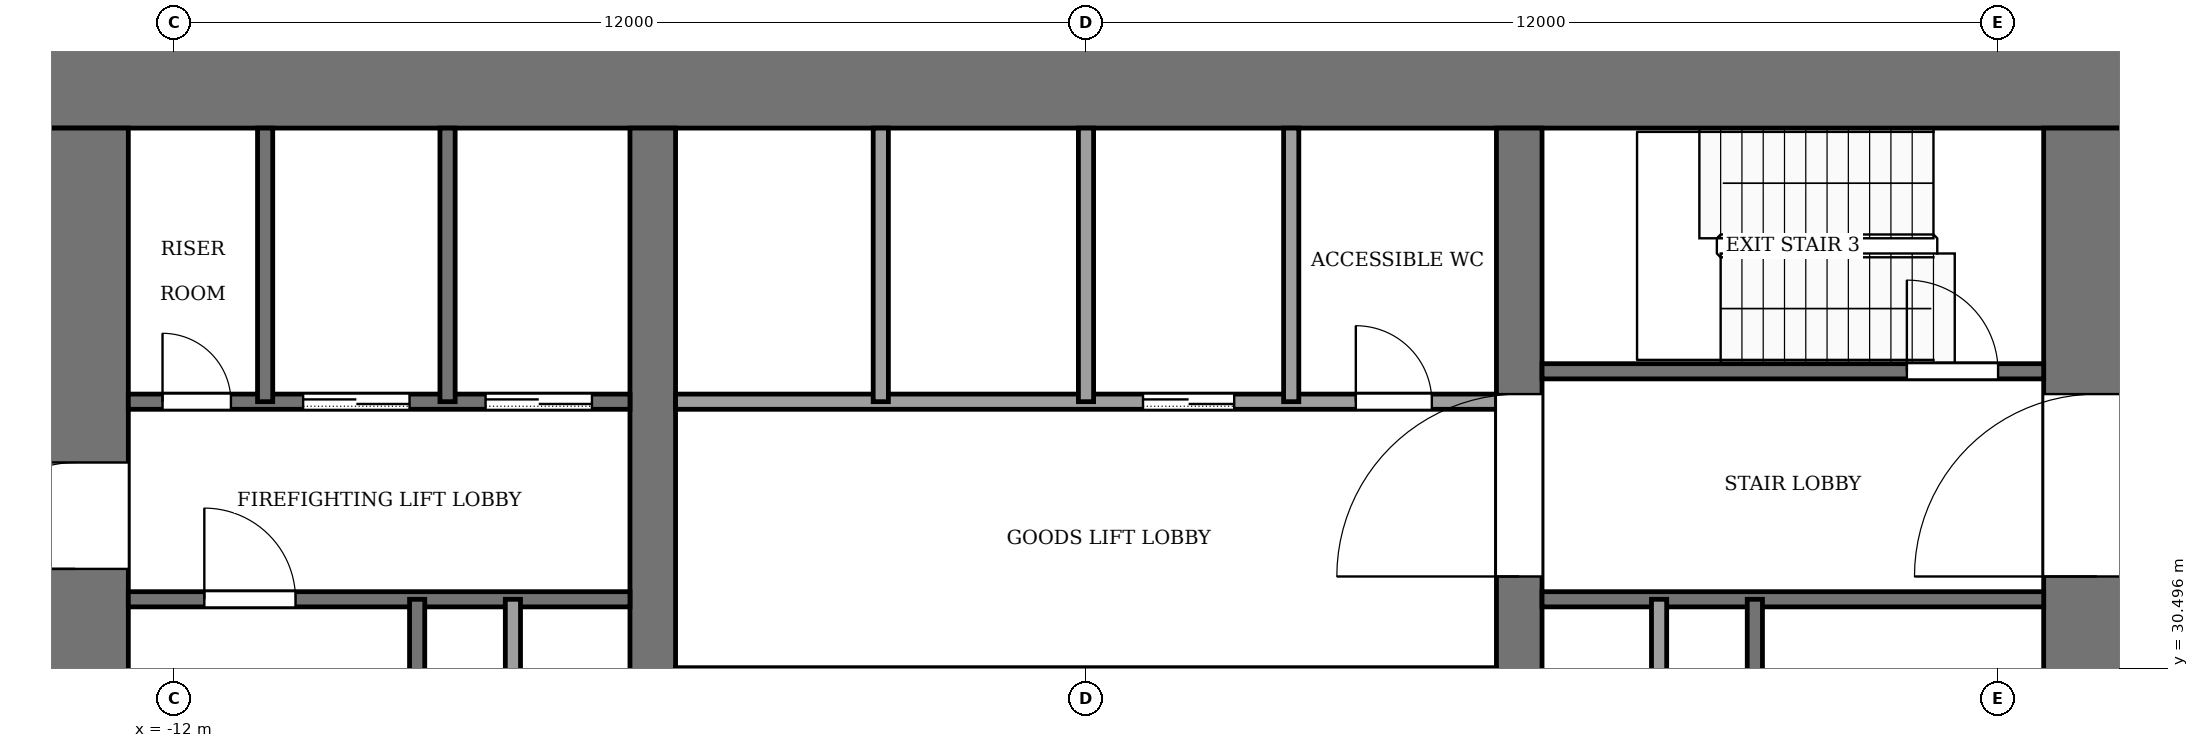
"""IFC4 building model, lengths in metres.
Left out: names, types, materials, properties, quantities, classifications, styles, units other than length and angle.
Written with IfcOpenShell. Run it as: python <this file> out.ifc"""

import sys

from ifc_helpers import new_model, si_unit, direction, frame, frame_2d, origin, place, context, subcontext, project, spatial, rectangle, extrude, element, fill, save


model = new_model("IFC4")
c1 = context("Model", 3, precision=1e-05, world=origin(), true_north=direction((0.0, 1.0)))
c2 = subcontext(c1, "Body", "Model", "MODEL_VIEW")
j1 = project(units=[si_unit("LENGTHUNIT", "METRE"), si_unit("PLANEANGLEUNIT", "RADIAN")], contexts=[c1])
p1 = place(None, origin())
s1 = spatial("IfcSite", under=j1, at=p1, CompositionType="ELEMENT")
p2 = place(p1, origin())
s2 = spatial("IfcBuilding", under=s1, at=p2, CompositionType="ELEMENT")
p3 = place(p2, frame((0.0, 0.0, 54.0)))
s3 = spatial("IfcBuildingStorey", under=s2, at=p3, CompositionType="ELEMENT", Elevation=54.0)
p4 = place(p3, frame((-14.0, 38.3, -0.13), z_axis=(0.0, 0.0, 1.0), x_axis=(1.0, 0.0, 0.0)))
e1 = element("IfcWall", 1, at=p4, inside=s3, PredefinedType="SHEAR", context=c2, shape_type="SweptSolid", body=[
    extrude(rectangle(XDim=28.0, YDim=1.4, at=frame_2d((14.0, 0.0))), origin(), (0.0, 0.0, 1.0), 3.88),
])
p5 = place(p3, frame((-13.3, 18.4, -0.13), z_axis=(0.0, 0.0, 1.0), x_axis=(0.0, 1.0, 0.0)))
e2 = element("IfcWall", 2, at=p5, inside=s3, PredefinedType="SHEAR", context=c2, shape_type="SweptSolid", body=[
    extrude(rectangle(XDim=19.2, YDim=1.4, at=frame_2d((9.6, 0.0))), origin(), (0.0, 0.0, 1.0), 3.88),
])
p6 = place(p5, frame((2.8, 0.0, 0.13)))
e3 = element("IfcOpeningElement", 3, at=p6, cuts=e2, PredefinedType="OPENING", context=c2, shape_type="SweptSolid", body=[
    extrude(rectangle(XDim=2.4, YDim=2.4, at=frame_2d((1.2, 1.2))), frame((0.0, 0.71, 0.0), z_axis=(0.0, -1.0, 0.0), x_axis=(1.0, 0.0, 0.0)), (0.0, 0.0, 1.0), 1.42),
])
p7 = place(p5, frame((13.4, 0.0, 0.13)))
e4 = element("IfcOpeningElement", 4, at=p7, cuts=e2, PredefinedType="OPENING", context=c2, shape_type="SweptSolid", body=[
    extrude(rectangle(XDim=1.4, YDim=2.2, at=frame_2d((0.7, 1.1))), frame((0.0, 0.71, 0.0), z_axis=(0.0, -1.0, 0.0), x_axis=(1.0, 0.0, 0.0)), (0.0, 0.0, 1.0), 1.42),
])
p8 = place(p3, frame((13.3, 18.4, -0.13), z_axis=(0.0, 0.0, 1.0), x_axis=(0.0, 1.0, 0.0)))
e5 = element("IfcWall", 5, at=p8, inside=s3, PredefinedType="SHEAR", context=c2, shape_type="SweptSolid", body=[
    extrude(rectangle(XDim=19.2, YDim=1.4, at=frame_2d((9.6, 0.0))), origin(), (0.0, 0.0, 1.0), 3.88),
])
p9 = place(p8, frame((2.8, 0.0, 0.13)))
e6 = element("IfcOpeningElement", 6, at=p9, cuts=e5, PredefinedType="OPENING", context=c2, shape_type="SweptSolid", body=[
    extrude(rectangle(XDim=2.4, YDim=2.4, at=frame_2d((1.2, 1.2))), frame((0.0, 0.71, 0.0), z_axis=(0.0, -1.0, 0.0), x_axis=(1.0, 0.0, 0.0)), (0.0, 0.0, 1.0), 1.42),
])
p10 = place(p8, frame((13.3, 0.0, 0.13)))
e7 = element("IfcOpeningElement", 7, at=p10, cuts=e5, PredefinedType="OPENING", context=c2, shape_type="SweptSolid", body=[
    extrude(rectangle(XDim=2.4, YDim=2.4, at=frame_2d((1.2, 1.2))), frame((0.0, 0.71, 0.0), z_axis=(0.0, -1.0, 0.0), x_axis=(1.0, 0.0, 0.0)), (0.0, 0.0, 1.0), 1.42),
])
p11 = place(p3, frame((-5.7, 18.4, -0.13), z_axis=(0.0, 0.0, 1.0), x_axis=(0.0, 1.0, 0.0)))
e8 = element("IfcWall", 8, at=p11, inside=s3, PredefinedType="SHEAR", context=c2, shape_type="SweptSolid", body=[
    extrude(rectangle(XDim=19.2, YDim=0.6, at=frame_2d((9.6, 0.0))), origin(), (0.0, 0.0, 1.0), 3.88),
])
p12 = place(p11, frame((8.35, 0.0, 0.13)))
e9 = element("IfcOpeningElement", 9, at=p12, cuts=e8, PredefinedType="OPENING", context=c2, shape_type="SweptSolid", body=[
    extrude(rectangle(XDim=0.9, YDim=2.1, at=frame_2d((0.45, 1.05))), frame((0.0, 0.31, 0.0), z_axis=(0.0, -1.0, 0.0), x_axis=(1.0, 0.0, 0.0)), (0.0, 0.0, 1.0), 0.62),
])
p13 = place(p3, frame((5.7, 18.4, -0.13), z_axis=(0.0, 0.0, 1.0), x_axis=(0.0, 1.0, 0.0)))
e10 = element("IfcWall", 10, at=p13, inside=s3, PredefinedType="SHEAR", context=c2, shape_type="SweptSolid", body=[
    extrude(rectangle(XDim=19.2, YDim=0.6, at=frame_2d((9.6, 0.0))), origin(), (0.0, 0.0, 1.0), 3.88),
])
p14 = place(p13, frame((8.35, 0.0, 0.13)))
e11 = element("IfcOpeningElement", 11, at=p14, cuts=e10, PredefinedType="OPENING", context=c2, shape_type="SweptSolid", body=[
    extrude(rectangle(XDim=0.9, YDim=2.1, at=frame_2d((0.45, 1.05))), frame((0.0, 0.31, 0.0), z_axis=(0.0, -1.0, 0.0), x_axis=(1.0, 0.0, 0.0)), (0.0, 0.0, 1.0), 0.62),
])
p15 = place(p13, frame((13.3, 0.0, 0.13)))
e12 = element("IfcOpeningElement", 12, at=p15, cuts=e10, PredefinedType="OPENING", context=c2, shape_type="SweptSolid", body=[
    extrude(rectangle(XDim=2.4, YDim=2.4, at=frame_2d((1.2, 1.2))), frame((0.0, 0.31, 0.0), z_axis=(0.0, -1.0, 0.0), x_axis=(1.0, 0.0, 0.0)), (0.0, 0.0, 1.0), 0.62),
])
p16 = place(p3, frame((-12.6, 31.4, 0.0), z_axis=(0.0, 0.0, 1.0), x_axis=(1.0, 0.0, 0.0)))
e13 = element("IfcWall", 13, at=p16, inside=s3, PredefinedType="PARTITIONING", context=c2, shape_type="SweptSolid", body=[
    extrude(rectangle(XDim=6.6, YDim=0.2, at=frame_2d((3.3, 0.0))), origin(), (0.0, 0.0, 1.0), 3.75),
])
p17 = place(p16, frame((1.0, 0.0, 0.0)))
e14 = element("IfcOpeningElement", 14, at=p17, cuts=e13, PredefinedType="OPENING", context=c2, shape_type="SweptSolid", body=[
    extrude(rectangle(XDim=1.2, YDim=2.2, at=frame_2d((0.6, 1.1))), frame((0.0, 0.11, 0.0), z_axis=(0.0, -1.0, 0.0), x_axis=(1.0, 0.0, 0.0)), (0.0, 0.0, 1.0), 0.22),
])
p18 = place(p3, frame((6.0, 31.4, 0.0), z_axis=(0.0, 0.0, 1.0), x_axis=(1.0, 0.0, 0.0)))
e15 = element("IfcWall", 15, at=p18, inside=s3, PredefinedType="PARTITIONING", context=c2, shape_type="SweptSolid", body=[
    extrude(rectangle(XDim=6.6, YDim=0.2, at=frame_2d((3.3, 0.0))), origin(), (0.0, 0.0, 1.0), 3.75),
])
p19 = place(p3, frame((-12.6, 34.0, 0.0), z_axis=(0.0, 0.0, 1.0), x_axis=(1.0, 0.0, 0.0)))
e16 = element("IfcWall", 16, at=p19, inside=s3, PredefinedType="PARTITIONING", context=c2, shape_type="SweptSolid", body=[
    extrude(rectangle(XDim=6.6, YDim=0.2, at=frame_2d((3.3, 0.0))), origin(), (0.0, 0.0, 1.0), 3.75),
])
p20 = place(p19, frame((4.7, 0.0, 0.0)))
e17 = element("IfcOpeningElement", 17, at=p20, cuts=e16, PredefinedType="OPENING", context=c2, shape_type="SweptSolid", body=[
    extrude(rectangle(XDim=1.4, YDim=2.2, at=frame_2d((0.7, 1.1))), frame((0.0, 0.11, 0.0), z_axis=(0.0, -1.0, 0.0), x_axis=(1.0, 0.0, 0.0)), (0.0, 0.0, 1.0), 0.22),
])
p21 = place(p19, frame((2.3, 0.0, 0.0)))
e18 = element("IfcOpeningElement", 18, at=p21, cuts=e16, PredefinedType="OPENING", context=c2, shape_type="SweptSolid", body=[
    extrude(rectangle(XDim=1.4, YDim=2.2, at=frame_2d((0.7, 1.1))), frame((0.0, 0.11, 0.0), z_axis=(0.0, -1.0, 0.0), x_axis=(1.0, 0.0, 0.0)), (0.0, 0.0, 1.0), 0.22),
])
p22 = place(p19, frame((0.45, 0.0, 0.0)))
e19 = element("IfcOpeningElement", 19, at=p22, cuts=e16, PredefinedType="OPENING", context=c2, shape_type="SweptSolid", body=[
    extrude(rectangle(XDim=0.9, YDim=2.1, at=frame_2d((0.45, 1.05))), frame((0.0, 0.11, 0.0), z_axis=(0.0, -1.0, 0.0), x_axis=(1.0, 0.0, 0.0)), (0.0, 0.0, 1.0), 0.22),
])
p23 = place(p3, frame((-5.4, 34.0, 0.0), z_axis=(0.0, 0.0, 1.0), x_axis=(1.0, 0.0, 0.0)))
e20 = element("IfcWall", 20, at=p23, inside=s3, PredefinedType="PARTITIONING", context=c2, shape_type="SweptSolid", body=[
    extrude(rectangle(XDim=10.8, YDim=0.2, at=frame_2d((5.4, 0.0))), origin(), (0.0, 0.0, 1.0), 3.75),
])
p24 = place(p23, frame((6.15, 0.0, 0.0)))
e21 = element("IfcOpeningElement", 21, at=p24, cuts=e20, PredefinedType="OPENING", context=c2, shape_type="SweptSolid", body=[
    extrude(rectangle(XDim=1.2, YDim=2.2, at=frame_2d((0.6, 1.1))), frame((0.0, 0.11, 0.0), z_axis=(0.0, -1.0, 0.0), x_axis=(1.0, 0.0, 0.0)), (0.0, 0.0, 1.0), 0.22),
])
p25 = place(p23, frame((8.95, 0.0, 0.0)))
e22 = element("IfcOpeningElement", 22, at=p25, cuts=e20, PredefinedType="OPENING", context=c2, shape_type="SweptSolid", body=[
    extrude(rectangle(XDim=1.0, YDim=2.1, at=frame_2d((0.5, 1.05))), frame((0.0, 0.11, 0.0), z_axis=(0.0, -1.0, 0.0), x_axis=(1.0, 0.0, 0.0)), (0.0, 0.0, 1.0), 0.22),
])
p26 = place(p3, frame((6.0, 34.4, 0.0), z_axis=(0.0, 0.0, 1.0), x_axis=(1.0, 0.0, 0.0)))
e23 = element("IfcWall", 23, at=p26, inside=s3, PredefinedType="PARTITIONING", context=c2, shape_type="SweptSolid", body=[
    extrude(rectangle(XDim=6.6, YDim=0.2, at=frame_2d((3.3, 0.0))), origin(), (0.0, 0.0, 1.0), 3.75),
])
p27 = place(p26, frame((4.8, 0.0, 0.0)))
e24 = element("IfcOpeningElement", 24, at=p27, cuts=e23, PredefinedType="OPENING", context=c2, shape_type="SweptSolid", body=[
    extrude(rectangle(XDim=1.2, YDim=2.2, at=frame_2d((0.6, 1.1))), frame((0.0, 0.11, 0.0), z_axis=(0.0, -1.0, 0.0), x_axis=(1.0, 0.0, 0.0)), (0.0, 0.0, 1.0), 0.22),
])
p28 = place(p3, frame((-10.8, 34.0, 0.0), z_axis=(0.0, 0.0, 1.0), x_axis=(0.0, 1.0, 0.0)))
e25 = element("IfcWall", 25, at=p28, inside=s3, PredefinedType="PARTITIONING", context=c2, shape_type="SweptSolid", body=[
    extrude(rectangle(XDim=3.6, YDim=0.2, at=frame_2d((1.8, 0.0))), origin(), (0.0, 0.0, 1.0), 3.75),
])
p29 = place(p3, frame((-8.8, 24.0, 0.0), z_axis=(0.0, 0.0, 1.0), x_axis=(0.0, 1.0, 0.0)))
e26 = element("IfcWall", 26, at=p29, inside=s3, PredefinedType="PARTITIONING", context=c2, shape_type="SweptSolid", body=[
    extrude(rectangle(XDim=7.4, YDim=0.2, at=frame_2d((3.7, 0.0))), origin(), (0.0, 0.0, 1.0), 3.75),
])
p30 = place(p3, frame((-8.4, 34.0, 0.0), z_axis=(0.0, 0.0, 1.0), x_axis=(0.0, 1.0, 0.0)))
e27 = element("IfcWall", 27, at=p30, inside=s3, PredefinedType="PARTITIONING", context=c2, shape_type="SweptSolid", body=[
    extrude(rectangle(XDim=3.6, YDim=0.2, at=frame_2d((1.8, 0.0))), origin(), (0.0, 0.0, 1.0), 3.75),
])
p31 = place(p3, frame((-7.54, 24.0, 0.0), z_axis=(0.0, 0.0, 1.0), x_axis=(0.0, 1.0, 0.0)))
e28 = element("IfcWall", 28, at=p31, inside=s3, PredefinedType="PARTITIONING", context=c2, shape_type="SweptSolid", body=[
    extrude(rectangle(XDim=7.4, YDim=0.2, at=frame_2d((3.7, 0.0))), origin(), (0.0, 0.0, 1.0), 3.75),
])
for number, where, z_axis, x_axis in (
    (29, (-2.7, 34.0, 0.0), (0.0, 0.0, 1.0), (0.0, 1.0, 0.0)),
    (30, (0.0, 34.0, 0.0), (0.0, 0.0, 1.0), (0.0, 1.0, 0.0)),
    (31, (2.7, 34.0, 0.0), (0.0, 0.0, 1.0), (0.0, 1.0, 0.0)),
):
    element("IfcWall", number, at=place(p3, frame(where, z_axis=z_axis, x_axis=x_axis)), inside=s3, PredefinedType="PARTITIONING", context=c2, shape_type="SweptSolid", body=[
        extrude(rectangle(XDim=3.6, YDim=0.2, at=frame_2d((1.8, 0.0))), origin(), (0.0, 0.0, 1.0), 3.75),
    ])
for number, where, z_axis, x_axis in (
    (32, (7.54, 24.0, 0.0), (0.0, 0.0, 1.0), (0.0, 1.0, 0.0)),
    (33, (8.8, 24.0, 0.0), (0.0, 0.0, 1.0), (0.0, 1.0, 0.0)),
):
    element("IfcWall", number, at=place(p3, frame(where, z_axis=z_axis, x_axis=x_axis)), inside=s3, PredefinedType="PARTITIONING", context=c2, shape_type="SweptSolid", body=[
        extrude(rectangle(XDim=7.4, YDim=0.2, at=frame_2d((3.7, 0.0))), origin(), (0.0, 0.0, 1.0), 3.75),
    ])
p32 = place(p24, origin())
e34 = element("IfcDoor", 34, at=p32, inside=s3, OperationType="SLIDING_TO_LEFT", PredefinedType="DOOR", context=c2, shape_type="SweptSolid", body=[
    extrude(rectangle(XDim=1.2, YDim=2.2, at=frame_2d((0.6, 1.1))), frame((0.0, 0.025, 0.0), z_axis=(0.0, -1.0, 0.0), x_axis=(1.0, 0.0, 0.0)), (0.0, 0.0, 1.0), 0.05),
])
fill(e21, e34)
p33 = place(p20, origin())
e35 = element("IfcDoor", 35, at=p33, inside=s3, OperationType="SLIDING_TO_LEFT", PredefinedType="DOOR", context=c2, shape_type="SweptSolid", body=[
    extrude(rectangle(XDim=1.4, YDim=2.2, at=frame_2d((0.7, 1.1))), frame((0.0, 0.025, 0.0), z_axis=(0.0, -1.0, 0.0), x_axis=(1.0, 0.0, 0.0)), (0.0, 0.0, 1.0), 0.05),
])
fill(e17, e35)
p34 = place(p21, origin())
e36 = element("IfcDoor", 36, at=p34, inside=s3, OperationType="SLIDING_TO_LEFT", PredefinedType="DOOR", context=c2, shape_type="SweptSolid", body=[
    extrude(rectangle(XDim=1.4, YDim=2.2, at=frame_2d((0.7, 1.1))), frame((0.0, 0.025, 0.0), z_axis=(0.0, -1.0, 0.0), x_axis=(1.0, 0.0, 0.0)), (0.0, 0.0, 1.0), 0.05),
])
fill(e18, e36)
p35 = place(p22, origin())
e37 = element("IfcDoor", 37, at=p35, inside=s3, OperationType="SINGLE_SWING_RIGHT", PredefinedType="DOOR", context=c2, shape_type="SweptSolid", body=[
    extrude(rectangle(XDim=0.9, YDim=2.1, at=frame_2d((0.45, 1.05))), frame((0.0, 0.025, 0.0), z_axis=(0.0, -1.0, 0.0), x_axis=(1.0, 0.0, 0.0)), (0.0, 0.0, 1.0), 0.05),
])
fill(e19, e37)
p36 = place(p25, origin())
e38 = element("IfcDoor", 38, at=p36, inside=s3, OperationType="SINGLE_SWING_LEFT", PredefinedType="DOOR", context=c2, shape_type="SweptSolid", body=[
    extrude(rectangle(XDim=1.0, YDim=2.1, at=frame_2d((0.5, 1.05))), frame((0.0, 0.025, 0.0), z_axis=(0.0, -1.0, 0.0), x_axis=(1.0, 0.0, 0.0)), (0.0, 0.0, 1.0), 0.05),
])
fill(e22, e38)
p37 = place(p17, origin())
e39 = element("IfcDoor", 39, at=p37, inside=s3, OperationType="SINGLE_SWING_LEFT", PredefinedType="DOOR", context=c2, shape_type="SweptSolid", body=[
    extrude(rectangle(XDim=1.2, YDim=2.2, at=frame_2d((0.6, 1.1))), frame((0.0, 0.025, 0.0), z_axis=(0.0, -1.0, 0.0), x_axis=(1.0, 0.0, 0.0)), (0.0, 0.0, 1.0), 0.05),
])
fill(e14, e39)
p38 = place(p27, origin())
e40 = element("IfcDoor", 40, at=p38, inside=s3, OperationType="SINGLE_SWING_LEFT", PredefinedType="DOOR", context=c2, shape_type="SweptSolid", body=[
    extrude(rectangle(XDim=1.2, YDim=2.2, at=frame_2d((0.6, 1.1))), frame((0.0, 0.025, 0.0), z_axis=(0.0, -1.0, 0.0), x_axis=(1.0, 0.0, 0.0)), (0.0, 0.0, 1.0), 0.05),
])
fill(e24, e40)
p39 = place(p15, origin())
e41 = element("IfcDoor", 41, at=p39, inside=s3, OperationType="DOUBLE_DOOR_SINGLE_SWING", PredefinedType="DOOR", context=c2, shape_type="SweptSolid", body=[
    extrude(rectangle(XDim=2.4, YDim=2.4, at=frame_2d((1.2, 1.2))), frame((0.0, 0.025, 0.0), z_axis=(0.0, -1.0, 0.0), x_axis=(1.0, 0.0, 0.0)), (0.0, 0.0, 1.0), 0.05),
])
fill(e12, e41)
p40 = place(p10, origin())
e42 = element("IfcDoor", 42, at=p40, inside=s3, OperationType="DOUBLE_DOOR_SINGLE_SWING", PredefinedType="DOOR", context=c2, shape_type="SweptSolid", body=[
    extrude(rectangle(XDim=2.4, YDim=2.4, at=frame_2d((1.2, 1.2))), frame((0.0, 0.025, 0.0), z_axis=(0.0, -1.0, 0.0), x_axis=(1.0, 0.0, 0.0)), (0.0, 0.0, 1.0), 0.05),
])
fill(e7, e42)
p41 = place(p7, origin())
e43 = element("IfcDoor", 43, at=p41, inside=s3, OperationType="SINGLE_SWING_LEFT", PredefinedType="DOOR", context=c2, shape_type="SweptSolid", body=[
    extrude(rectangle(XDim=1.4, YDim=2.2, at=frame_2d((0.7, 1.1))), frame((0.0, 0.025, 0.0), z_axis=(0.0, -1.0, 0.0), x_axis=(1.0, 0.0, 0.0)), (0.0, 0.0, 1.0), 0.05),
])
fill(e4, e43)
save(model, sys.argv[1])
